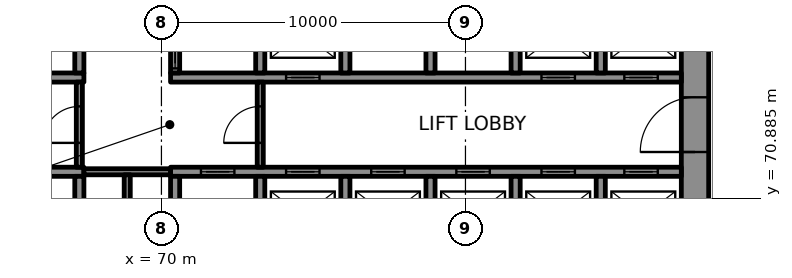
"""IFC4 building model, lengths in metres.
Left out: names, types, materials, properties, quantities, classifications, styles, units other than length and angle.
Written with IfcOpenShell. Run it as: python <this file> out.ifc"""

import sys

from ifc_helpers import new_model, si_unit, direction, frame, frame_2d, origin, place, context, subcontext, project, spatial, rectangle, extrude, element, fill, save


model = new_model("IFC4")
c1 = context("Model", 3, precision=1e-05, world=origin(), true_north=direction((0.0, 1.0)))
c2 = subcontext(c1, "Body", "Model", "MODEL_VIEW")
j1 = project(units=[si_unit("LENGTHUNIT", "METRE"), si_unit("PLANEANGLEUNIT", "RADIAN")], contexts=[c1])
p1 = place(None, origin())
s1 = spatial("IfcSite", under=j1, at=p1, CompositionType="ELEMENT")
p2 = place(p1, origin())
s2 = spatial("IfcBuilding", under=s1, at=p2, CompositionType="ELEMENT")
p3 = place(p2, frame((0.0, 0.0, -5.0)))
s3 = spatial("IfcBuildingStorey", under=s2, at=p3, CompositionType="ELEMENT", Elevation=-5.0)
p4 = place(p3, frame((109.132, 57.451, -0.35), z_axis=(0.0, 0.0, 1.0), x_axis=(-0.499999206999, 0.866025861623, 0.0)))
e1 = element("IfcWall", 1, at=p4, inside=s3, PredefinedType="SOLIDWALL", context=c2, shape_type="SweptSolid", body=[
    extrude(rectangle(XDim=61.064, YDim=0.6, at=frame_2d((30.532, 0.0))), origin(), (0.0, 0.0, 1.0), 5.05),
])
p5 = place(p3, frame((67.936, 110.334, -0.35), z_axis=(0.0, 0.0, 1.0), x_axis=(-0.499999089162, -0.866025929656, 0.0)))
e2 = element("IfcWall", 2, at=p5, inside=s3, PredefinedType="SOLIDWALL", context=c2, shape_type="SweptSolid", body=[
    extrude(rectangle(XDim=53.501, YDim=0.6, at=frame_2d((26.751, 0.0))), origin(), (0.0, 0.0, 1.0), 5.05),
])
p6 = place(p3, frame((87.55, 66.9, 0.0), z_axis=(0.0, 0.0, 1.0), x_axis=(0.0, 1.0, 0.0)))
e3 = element("IfcWall", 3, at=p6, inside=s3, PredefinedType="SHEAR", context=c2, shape_type="SweptSolid", body=[
    extrude(rectangle(XDim=16.2, YDim=0.9, at=frame_2d((8.1, 0.0))), origin(), (0.0, 0.0, 1.0), 4.7),
])
p7 = place(p6, frame((5.5, 0.0, 0.0)))
e4 = element("IfcOpeningElement", 4, at=p7, cuts=e3, PredefinedType="OPENING", context=c2, shape_type="SweptSolid", body=[
    extrude(rectangle(XDim=1.8, YDim=2.1, at=frame_2d((0.9, 1.05))), frame((0.0, 0.46, 0.0), z_axis=(0.0, -1.0, 0.0), x_axis=(1.0, 0.0, 0.0)), (0.0, 0.0, 1.0), 0.92),
])
p8 = place(p6, frame((11.202, 0.0, 0.0)))
e5 = element("IfcOpeningElement", 5, at=p8, cuts=e3, PredefinedType="OPENING", context=c2, shape_type="SweptSolid", body=[
    extrude(rectangle(XDim=0.9, YDim=2.1, at=frame_2d((0.45, 1.05))), frame((0.0, 0.46, 0.0), z_axis=(0.0, -1.0, 0.0), x_axis=(1.0, 0.0, 0.0)), (0.0, 0.0, 1.0), 0.92),
])
p9 = place(p3, frame((64.35, 71.75, 0.0), z_axis=(0.0, 0.0, 1.0), x_axis=(1.0, 0.0, 0.0)))
e6 = element("IfcWall", 6, at=p9, inside=s3, PredefinedType="SHEAR", context=c2, shape_type="SweptSolid", body=[
    extrude(rectangle(XDim=3.1, YDim=0.3, at=frame_2d((1.55, 0.0))), origin(), (0.0, 0.0, 1.0), 4.7),
])
p10 = place(p3, frame((70.3, 71.75, 0.0), z_axis=(0.0, 0.0, 1.0), x_axis=(1.0, 0.0, 0.0)))
e7 = element("IfcWall", 7, at=p10, inside=s3, PredefinedType="SHEAR", context=c2, shape_type="SweptSolid", body=[
    extrude(rectangle(XDim=16.8, YDim=0.3, at=frame_2d((8.4, 0.0))), origin(), (0.0, 0.0, 1.0), 4.7),
])
p11 = place(p10, frame((1.0, 0.0, 0.0)))
e8 = element("IfcOpeningElement", 8, at=p11, cuts=e7, PredefinedType="OPENING", context=c2, shape_type="SweptSolid", body=[
    extrude(rectangle(XDim=1.1, YDim=2.1, at=frame_2d((0.55, 1.05))), frame((0.0, 0.16, 0.0), z_axis=(0.0, -1.0, 0.0), x_axis=(1.0, 0.0, 0.0)), (0.0, 0.0, 1.0), 0.32),
])
p12 = place(p10, frame((3.8, 0.0, 0.0)))
e9 = element("IfcOpeningElement", 9, at=p12, cuts=e7, PredefinedType="OPENING", context=c2, shape_type="SweptSolid", body=[
    extrude(rectangle(XDim=1.1, YDim=2.1, at=frame_2d((0.55, 1.05))), frame((0.0, 0.16, 0.0), z_axis=(0.0, -1.0, 0.0), x_axis=(1.0, 0.0, 0.0)), (0.0, 0.0, 1.0), 0.32),
])
p13 = place(p10, frame((6.6, 0.0, 0.0)))
e10 = element("IfcOpeningElement", 10, at=p13, cuts=e7, PredefinedType="OPENING", context=c2, shape_type="SweptSolid", body=[
    extrude(rectangle(XDim=1.1, YDim=2.1, at=frame_2d((0.55, 1.05))), frame((0.0, 0.16, 0.0), z_axis=(0.0, -1.0, 0.0), x_axis=(1.0, 0.0, 0.0)), (0.0, 0.0, 1.0), 0.32),
])
p14 = place(p10, frame((9.4, 0.0, 0.0)))
e11 = element("IfcOpeningElement", 11, at=p14, cuts=e7, PredefinedType="OPENING", context=c2, shape_type="SweptSolid", body=[
    extrude(rectangle(XDim=1.1, YDim=2.1, at=frame_2d((0.55, 1.05))), frame((0.0, 0.16, 0.0), z_axis=(0.0, -1.0, 0.0), x_axis=(1.0, 0.0, 0.0)), (0.0, 0.0, 1.0), 0.32),
])
p15 = place(p10, frame((12.2, 0.0, 0.0)))
e12 = element("IfcOpeningElement", 12, at=p15, cuts=e7, PredefinedType="OPENING", context=c2, shape_type="SweptSolid", body=[
    extrude(rectangle(XDim=1.1, YDim=2.1, at=frame_2d((0.55, 1.05))), frame((0.0, 0.16, 0.0), z_axis=(0.0, -1.0, 0.0), x_axis=(1.0, 0.0, 0.0)), (0.0, 0.0, 1.0), 0.32),
])
p16 = place(p10, frame((14.925, 0.0, 0.0)))
e13 = element("IfcOpeningElement", 13, at=p16, cuts=e7, PredefinedType="OPENING", context=c2, shape_type="SweptSolid", body=[
    extrude(rectangle(XDim=1.1, YDim=2.1, at=frame_2d((0.55, 1.05))), frame((0.0, 0.16, 0.0), z_axis=(0.0, -1.0, 0.0), x_axis=(1.0, 0.0, 0.0)), (0.0, 0.0, 1.0), 0.32),
])
p17 = place(p3, frame((64.35, 74.85, 0.0), z_axis=(0.0, 0.0, 1.0), x_axis=(1.0, 0.0, 0.0)))
e14 = element("IfcWall", 14, at=p17, inside=s3, PredefinedType="SHEAR", context=c2, shape_type="SweptSolid", body=[
    extrude(rectangle(XDim=3.1, YDim=0.3, at=frame_2d((1.55, 0.0))), origin(), (0.0, 0.0, 1.0), 4.7),
])
p18 = place(p3, frame((70.3, 74.85, 0.0), z_axis=(0.0, 0.0, 1.0), x_axis=(1.0, 0.0, 0.0)))
e15 = element("IfcWall", 15, at=p18, inside=s3, PredefinedType="SHEAR", context=c2, shape_type="SweptSolid", body=[
    extrude(rectangle(XDim=16.8, YDim=0.3, at=frame_2d((8.4, 0.0))), origin(), (0.0, 0.0, 1.0), 4.7),
])
p19 = place(p18, frame((3.8, 0.0, 0.0)))
e16 = element("IfcOpeningElement", 16, at=p19, cuts=e15, PredefinedType="OPENING", context=c2, shape_type="SweptSolid", body=[
    extrude(rectangle(XDim=1.1, YDim=2.1, at=frame_2d((0.55, 1.05))), frame((0.0, 0.16, 0.0), z_axis=(0.0, -1.0, 0.0), x_axis=(1.0, 0.0, 0.0)), (0.0, 0.0, 1.0), 0.32),
])
p20 = place(p18, frame((12.2, 0.0, 0.0)))
e17 = element("IfcOpeningElement", 17, at=p20, cuts=e15, PredefinedType="OPENING", context=c2, shape_type="SweptSolid", body=[
    extrude(rectangle(XDim=1.1, YDim=2.1, at=frame_2d((0.55, 1.05))), frame((0.0, 0.16, 0.0), z_axis=(0.0, -1.0, 0.0), x_axis=(1.0, 0.0, 0.0)), (0.0, 0.0, 1.0), 0.32),
])
p21 = place(p18, frame((14.925, 0.0, 0.0)))
e18 = element("IfcOpeningElement", 18, at=p21, cuts=e15, PredefinedType="OPENING", context=c2, shape_type="SweptSolid", body=[
    extrude(rectangle(XDim=1.1, YDim=2.1, at=frame_2d((0.55, 1.05))), frame((0.0, 0.16, 0.0), z_axis=(0.0, -1.0, 0.0), x_axis=(1.0, 0.0, 0.0)), (0.0, 0.0, 1.0), 0.32),
])
for number, where, z_axis, x_axis in (
    (19, (67.3, 69.0, 0.0), (0.0, 0.0, 1.0), (0.0, 1.0, 0.0)),
    (20, (67.3, 75.0, 0.0), (0.0, 0.0, 1.0), (0.0, 1.0, 0.0)),
    (21, (70.45, 69.0, 0.0), (0.0, 0.0, 1.0), (0.0, 1.0, 0.0)),
):
    element("IfcWall", number, at=place(p3, frame(where, z_axis=z_axis, x_axis=x_axis)), inside=s3, PredefinedType="SHEAR", context=c2, shape_type="SweptSolid", body=[
        extrude(rectangle(XDim=2.6, YDim=0.3, at=frame_2d((1.3, 0.0))), origin(), (0.0, 0.0, 1.0), 4.7),
    ])
p22 = place(p3, frame((70.45, 75.0, 0.0), z_axis=(0.0, 0.0, 1.0), x_axis=(0.0, 1.0, 0.0)))
e22 = element("IfcWall", 22, at=p22, inside=s3, PredefinedType="SHEAR", context=c2, shape_type="SweptSolid", body=[
    extrude(rectangle(XDim=2.6, YDim=0.3, at=frame_2d((1.3, 0.0))), origin(), (0.0, 0.0, 1.0), 4.7),
])
p23 = place(p22, frame((0.15, 0.0, 0.0)))
e23 = element("IfcOpeningElement", 23, at=p23, cuts=e22, PredefinedType="OPENING", context=c2, shape_type="SweptSolid", body=[
    extrude(rectangle(XDim=1.1, YDim=2.1, at=frame_2d((0.55, 1.05))), frame((0.0, 0.16, 0.0), z_axis=(0.0, -1.0, 0.0), x_axis=(1.0, 0.0, 0.0)), (0.0, 0.0, 1.0), 0.32),
])
for number, where, z_axis, x_axis in (
    (24, (73.25, 69.0, 0.0), (0.0, 0.0, 1.0), (0.0, 1.0, 0.0)),
    (25, (73.25, 75.0, 0.0), (0.0, 0.0, 1.0), (0.0, 1.0, 0.0)),
    (26, (76.05, 69.0, 0.0), (0.0, 0.0, 1.0), (0.0, 1.0, 0.0)),
    (27, (76.05, 75.0, 0.0), (0.0, 0.0, 1.0), (0.0, 1.0, 0.0)),
    (28, (78.85, 69.0, 0.0), (0.0, 0.0, 1.0), (0.0, 1.0, 0.0)),
    (29, (78.85, 75.0, 0.0), (0.0, 0.0, 1.0), (0.0, 1.0, 0.0)),
    (30, (81.65, 69.0, 0.0), (0.0, 0.0, 1.0), (0.0, 1.0, 0.0)),
    (31, (81.65, 75.0, 0.0), (0.0, 0.0, 1.0), (0.0, 1.0, 0.0)),
    (32, (84.45, 69.0, 0.0), (0.0, 0.0, 1.0), (0.0, 1.0, 0.0)),
    (33, (84.45, 75.0, 0.0), (0.0, 0.0, 1.0), (0.0, 1.0, 0.0)),
):
    element("IfcWall", number, at=place(p3, frame(where, z_axis=z_axis, x_axis=x_axis)), inside=s3, PredefinedType="SHEAR", context=c2, shape_type="SweptSolid", body=[
        extrude(rectangle(XDim=2.6, YDim=0.3, at=frame_2d((1.3, 0.0))), origin(), (0.0, 0.0, 1.0), 4.7),
    ])
p24 = place(p3, frame((67.45, 71.75, 0.0), z_axis=(0.0, 0.0, 1.0), x_axis=(1.0, 0.0, 0.0)))
e34 = element("IfcWall", 34, at=p24, inside=s3, PredefinedType="PARTITIONING", context=c2, shape_type="SweptSolid", body=[
    extrude(rectangle(XDim=2.85, YDim=0.2, at=frame_2d((1.425, 0.0))), origin(), (0.0, 0.0, 1.0), 4.7),
])
p25 = place(p3, frame((67.3, 71.9, 0.0), z_axis=(0.0, 0.0, 1.0), x_axis=(0.0, 1.0, 0.0)))
e35 = element("IfcWall", 35, at=p25, inside=s3, PredefinedType="PARTITIONING", context=c2, shape_type="SweptSolid", body=[
    extrude(rectangle(XDim=2.8, YDim=0.2, at=frame_2d((1.4, 0.0))), origin(), (0.0, 0.0, 1.0), 4.7),
])
p26 = place(p25, frame((0.8, 0.0, 0.0)))
e36 = element("IfcOpeningElement", 36, at=p26, cuts=e35, PredefinedType="OPENING", context=c2, shape_type="SweptSolid", body=[
    extrude(rectangle(XDim=1.2, YDim=2.1, at=frame_2d((0.6, 1.05))), frame((0.0, 0.11, 0.0), z_axis=(0.0, -1.0, 0.0), x_axis=(1.0, 0.0, 0.0)), (0.0, 0.0, 1.0), 0.22),
])
p27 = place(p3, frame((68.875, 66.9, 0.0), z_axis=(0.0, 0.0, 1.0), x_axis=(0.0, 1.0, 0.0)))
e37 = element("IfcWall", 37, at=p27, inside=s3, PredefinedType="PARTITIONING", context=c2, shape_type="SweptSolid", body=[
    extrude(rectangle(XDim=4.75, YDim=0.2, at=frame_2d((2.375, 0.0))), origin(), (0.0, 0.0, 1.0), 4.7),
])
p28 = place(p3, frame((73.25, 71.9, 0.0), z_axis=(0.0, 0.0, 1.0), x_axis=(0.0, 1.0, 0.0)))
e38 = element("IfcWall", 38, at=p28, inside=s3, PredefinedType="PARTITIONING", context=c2, shape_type="SweptSolid", body=[
    extrude(rectangle(XDim=2.8, YDim=0.2, at=frame_2d((1.4, 0.0))), origin(), (0.0, 0.0, 1.0), 4.7),
])
p29 = place(p28, frame((0.8, 0.0, 0.0)))
e39 = element("IfcOpeningElement", 39, at=p29, cuts=e38, PredefinedType="OPENING", context=c2, shape_type="SweptSolid", body=[
    extrude(rectangle(XDim=1.2, YDim=2.1, at=frame_2d((0.6, 1.05))), frame((0.0, 0.11, 0.0), z_axis=(0.0, -1.0, 0.0), x_axis=(1.0, 0.0, 0.0)), (0.0, 0.0, 1.0), 0.22),
])
p30 = place(p11, origin())
e40 = element("IfcDoor", 40, at=p30, inside=s3, OperationType="DOUBLE_DOOR_SLIDING", PredefinedType="DOOR", context=c2, shape_type="SweptSolid", body=[
    extrude(rectangle(XDim=1.1, YDim=2.1, at=frame_2d((0.55, 1.05))), frame((0.0, 0.025, 0.0), z_axis=(0.0, -1.0, 0.0), x_axis=(1.0, 0.0, 0.0)), (0.0, 0.0, 1.0), 0.05),
])
fill(e8, e40)
p31 = place(p12, origin())
e41 = element("IfcDoor", 41, at=p31, inside=s3, OperationType="DOUBLE_DOOR_SLIDING", PredefinedType="DOOR", context=c2, shape_type="SweptSolid", body=[
    extrude(rectangle(XDim=1.1, YDim=2.1, at=frame_2d((0.55, 1.05))), frame((0.0, 0.025, 0.0), z_axis=(0.0, -1.0, 0.0), x_axis=(1.0, 0.0, 0.0)), (0.0, 0.0, 1.0), 0.05),
])
fill(e9, e41)
p32 = place(p13, origin())
e42 = element("IfcDoor", 42, at=p32, inside=s3, OperationType="DOUBLE_DOOR_SLIDING", PredefinedType="DOOR", context=c2, shape_type="SweptSolid", body=[
    extrude(rectangle(XDim=1.1, YDim=2.1, at=frame_2d((0.55, 1.05))), frame((0.0, 0.025, 0.0), z_axis=(0.0, -1.0, 0.0), x_axis=(1.0, 0.0, 0.0)), (0.0, 0.0, 1.0), 0.05),
])
fill(e10, e42)
p33 = place(p14, origin())
e43 = element("IfcDoor", 43, at=p33, inside=s3, OperationType="DOUBLE_DOOR_SLIDING", PredefinedType="DOOR", context=c2, shape_type="SweptSolid", body=[
    extrude(rectangle(XDim=1.1, YDim=2.1, at=frame_2d((0.55, 1.05))), frame((0.0, 0.025, 0.0), z_axis=(0.0, -1.0, 0.0), x_axis=(1.0, 0.0, 0.0)), (0.0, 0.0, 1.0), 0.05),
])
fill(e11, e43)
p34 = place(p15, origin())
e44 = element("IfcDoor", 44, at=p34, inside=s3, OperationType="DOUBLE_DOOR_SLIDING", PredefinedType="DOOR", context=c2, shape_type="SweptSolid", body=[
    extrude(rectangle(XDim=1.1, YDim=2.1, at=frame_2d((0.55, 1.05))), frame((0.0, 0.025, 0.0), z_axis=(0.0, -1.0, 0.0), x_axis=(1.0, 0.0, 0.0)), (0.0, 0.0, 1.0), 0.05),
])
fill(e12, e44)
p35 = place(p16, origin())
e45 = element("IfcDoor", 45, at=p35, inside=s3, OperationType="DOUBLE_DOOR_SLIDING", PredefinedType="DOOR", context=c2, shape_type="SweptSolid", body=[
    extrude(rectangle(XDim=1.1, YDim=2.1, at=frame_2d((0.55, 1.05))), frame((0.0, 0.025, 0.0), z_axis=(0.0, -1.0, 0.0), x_axis=(1.0, 0.0, 0.0)), (0.0, 0.0, 1.0), 0.05),
])
fill(e13, e45)
p36 = place(p23, origin())
e46 = element("IfcDoor", 46, at=p36, inside=s3, OperationType="DOUBLE_DOOR_SLIDING", PredefinedType="DOOR", context=c2, shape_type="SweptSolid", body=[
    extrude(rectangle(XDim=1.1, YDim=2.1, at=frame_2d((0.55, 1.05))), frame((0.0, 0.025, 0.0), z_axis=(0.0, -1.0, 0.0), x_axis=(1.0, 0.0, 0.0)), (0.0, 0.0, 1.0), 0.05),
])
fill(e23, e46)
p37 = place(p19, origin())
e47 = element("IfcDoor", 47, at=p37, inside=s3, OperationType="DOUBLE_DOOR_SLIDING", PredefinedType="DOOR", context=c2, shape_type="SweptSolid", body=[
    extrude(rectangle(XDim=1.1, YDim=2.1, at=frame_2d((0.55, 1.05))), frame((0.0, 0.025, 0.0), z_axis=(0.0, -1.0, 0.0), x_axis=(1.0, 0.0, 0.0)), (0.0, 0.0, 1.0), 0.05),
])
fill(e16, e47)
p38 = place(p20, origin())
e48 = element("IfcDoor", 48, at=p38, inside=s3, OperationType="DOUBLE_DOOR_SLIDING", PredefinedType="DOOR", context=c2, shape_type="SweptSolid", body=[
    extrude(rectangle(XDim=1.1, YDim=2.1, at=frame_2d((0.55, 1.05))), frame((0.0, 0.025, 0.0), z_axis=(0.0, -1.0, 0.0), x_axis=(1.0, 0.0, 0.0)), (0.0, 0.0, 1.0), 0.05),
])
fill(e17, e48)
p39 = place(p21, origin())
e49 = element("IfcDoor", 49, at=p39, inside=s3, OperationType="DOUBLE_DOOR_SLIDING", PredefinedType="DOOR", context=c2, shape_type="SweptSolid", body=[
    extrude(rectangle(XDim=1.1, YDim=2.1, at=frame_2d((0.55, 1.05))), frame((0.0, 0.025, 0.0), z_axis=(0.0, -1.0, 0.0), x_axis=(1.0, 0.0, 0.0)), (0.0, 0.0, 1.0), 0.05),
])
fill(e18, e49)
p40 = place(p29, origin())
e50 = element("IfcDoor", 50, at=p40, inside=s3, OperationType="SINGLE_SWING_LEFT", PredefinedType="DOOR", context=c2, shape_type="SweptSolid", body=[
    extrude(rectangle(XDim=1.2, YDim=2.1, at=frame_2d((0.6, 1.05))), frame((0.0, 0.025, 0.0), z_axis=(0.0, -1.0, 0.0), x_axis=(1.0, 0.0, 0.0)), (0.0, 0.0, 1.0), 0.05),
])
fill(e39, e50)
p41 = place(p26, origin())
e51 = element("IfcDoor", 51, at=p41, inside=s3, OperationType="SINGLE_SWING_RIGHT", PredefinedType="DOOR", context=c2, shape_type="SweptSolid", body=[
    extrude(rectangle(XDim=1.2, YDim=2.1, at=frame_2d((0.6, 1.05))), frame((0.0, 0.025, 0.0), z_axis=(0.0, -1.0, 0.0), x_axis=(1.0, 0.0, 0.0)), (0.0, 0.0, 1.0), 0.05),
])
fill(e36, e51)
p42 = place(p7, origin())
e52 = element("IfcDoor", 52, at=p42, inside=s3, OperationType="SINGLE_SWING_RIGHT", PredefinedType="DOOR", context=c2, shape_type="SweptSolid", body=[
    extrude(rectangle(XDim=1.8, YDim=2.1, at=frame_2d((0.9, 1.05))), frame((0.0, 0.17, 0.0), z_axis=(0.0, -1.0, 0.0), x_axis=(1.0, 0.0, 0.0)), (0.0, 0.0, 1.0), 0.34),
])
fill(e4, e52)
save(model, sys.argv[1])
